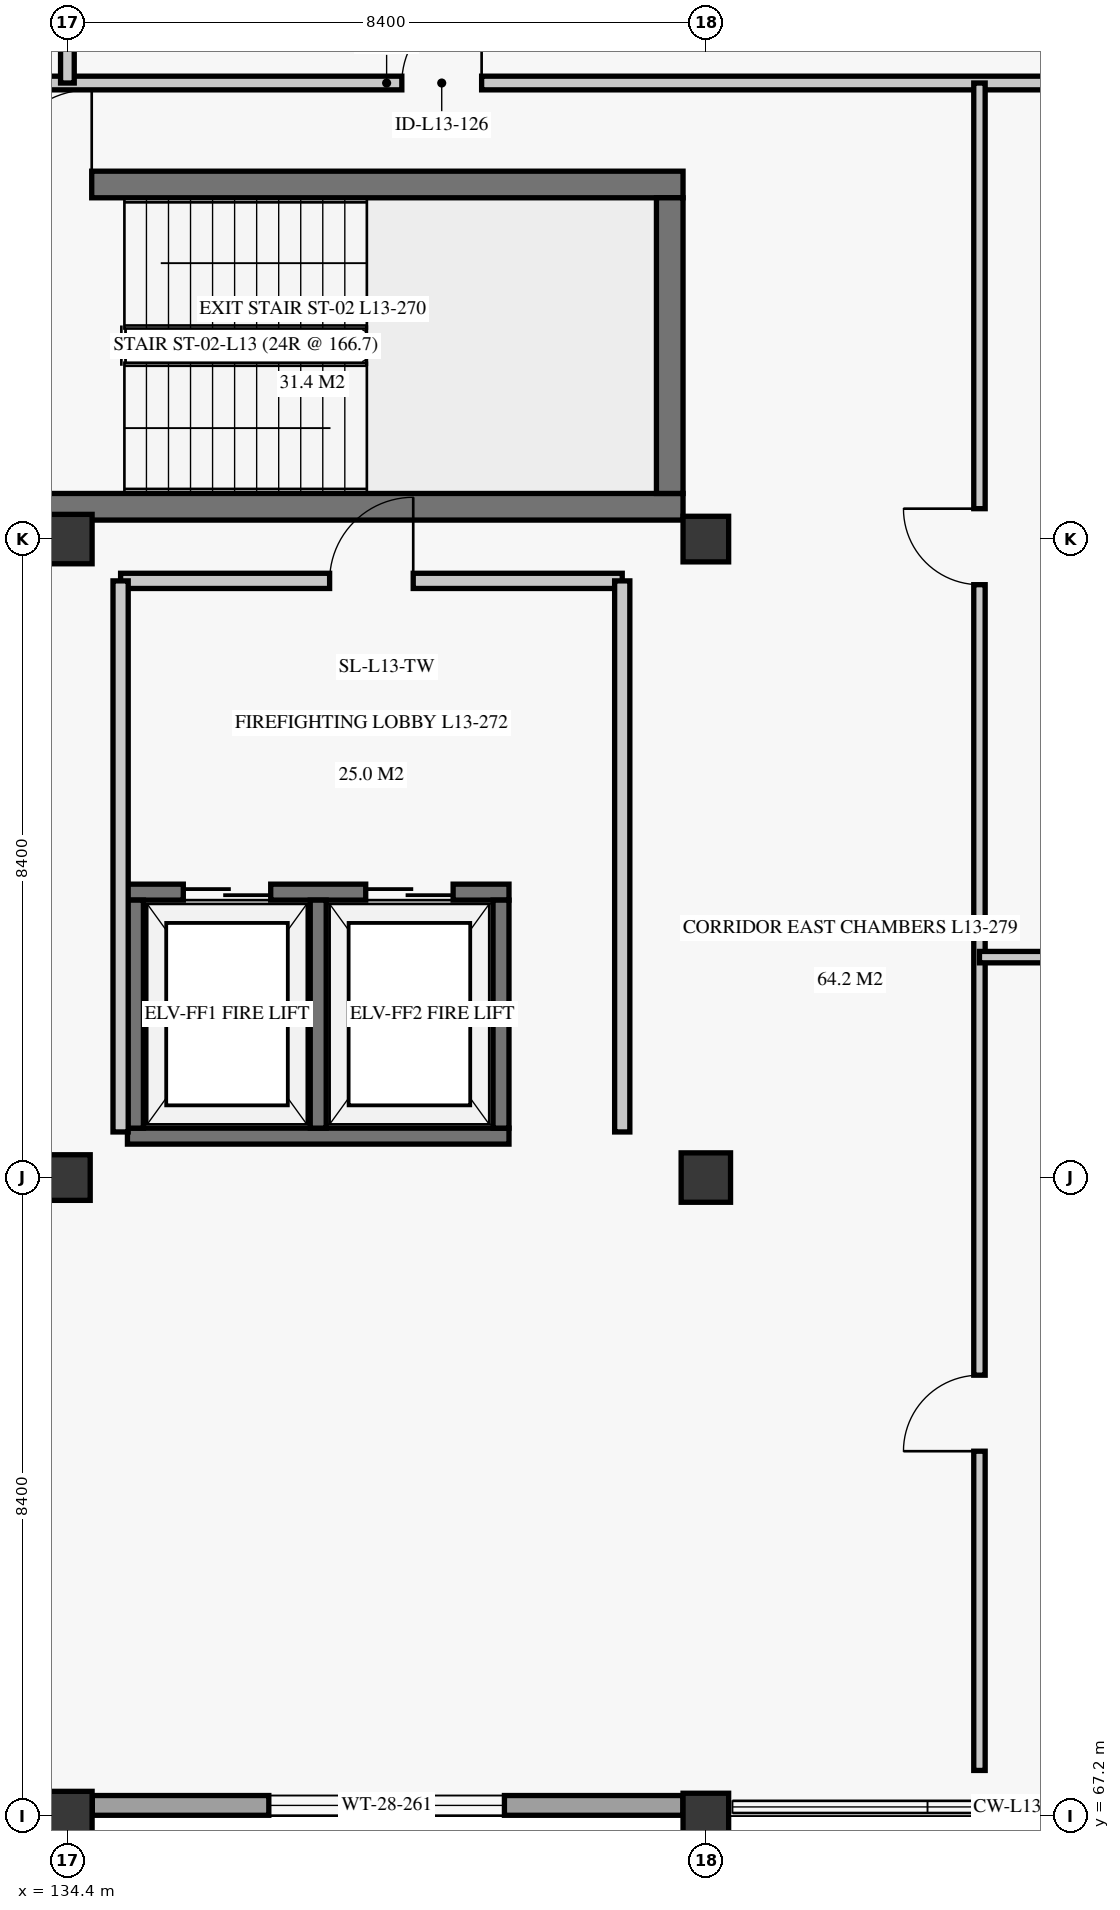
"""IFC4 building model, lengths in metres.
Left out: names, types, materials, properties, quantities, classifications, styles, units other than length and angle.
Written with IfcOpenShell. Run it as: python <this file> out.ifc"""

import sys

from ifc_helpers import new_model, si_unit, direction, frame, frame_2d, origin, origin_2d, place, context, subcontext, project, spatial, rectangle, extrude, element, fill, save


model = new_model("IFC4")
c1 = context("Model", 3, precision=1e-05, world=origin(), true_north=direction((0.0, 1.0)))
c2 = subcontext(c1, "Body", "Model", "MODEL_VIEW")
j1 = project(units=[si_unit("LENGTHUNIT", "METRE"), si_unit("PLANEANGLEUNIT", "RADIAN")], contexts=[c1])
p1 = place(None, origin())
s1 = spatial("IfcSite", under=j1, at=p1, CompositionType="ELEMENT")
p2 = place(p1, origin())
s2 = spatial("IfcBuilding", under=s1, at=p2, CompositionType="ELEMENT")
p3 = place(p2, frame((0.0, 0.0, 54.7)))
s3 = spatial("IfcBuildingStorey", under=s2, at=p3, CompositionType="ELEMENT", Elevation=54.7)
p4 = place(p3, frame((134.4, 67.2, 0.0), z_axis=(0.0, 0.0, 1.0), x_axis=(1.0, 0.0, 0.0)))
e1 = element("IfcColumn", 1, at=p4, inside=s3, PredefinedType="COLUMN", context=c2, shape_type="SweptSolid", body=[
    extrude(rectangle(XDim=0.65, YDim=0.65, at=origin_2d()), origin(), (0.0, 0.0, 1.0), 3.72),
])
p5 = place(p3, frame((134.4, 75.6, 0.0), z_axis=(0.0, 0.0, 1.0), x_axis=(1.0, 0.0, 0.0)))
e2 = element("IfcColumn", 2, at=p5, inside=s3, PredefinedType="COLUMN", context=c2, shape_type="SweptSolid", body=[
    extrude(rectangle(XDim=0.6, YDim=0.6, at=origin_2d()), origin(), (0.0, 0.0, 1.0), 3.72),
])
p6 = place(p3, frame((134.4, 84.0, 0.0), z_axis=(0.0, 0.0, 1.0), x_axis=(1.0, 0.0, 0.0)))
e3 = element("IfcColumn", 3, at=p6, inside=s3, PredefinedType="COLUMN", context=c2, shape_type="SweptSolid", body=[
    extrude(rectangle(XDim=0.65, YDim=0.65, at=origin_2d()), origin(), (0.0, 0.0, 1.0), 3.72),
])
p7 = place(p3, frame((142.8, 67.2, 0.0), z_axis=(0.0, 0.0, 1.0), x_axis=(1.0, 0.0, 0.0)))
e4 = element("IfcColumn", 4, at=p7, inside=s3, PredefinedType="COLUMN", context=c2, shape_type="SweptSolid", body=[
    extrude(rectangle(XDim=0.6, YDim=0.6, at=origin_2d()), origin(), (0.0, 0.0, 1.0), 3.72),
])
p8 = place(p3, frame((142.8, 75.6, 0.0), z_axis=(0.0, 0.0, 1.0), x_axis=(1.0, 0.0, 0.0)))
e5 = element("IfcColumn", 5, at=p8, inside=s3, PredefinedType="COLUMN", context=c2, shape_type="SweptSolid", body=[
    extrude(rectangle(XDim=0.65, YDim=0.65, at=origin_2d()), origin(), (0.0, 0.0, 1.0), 3.72),
])
p9 = place(p3, frame((142.8, 84.0, 0.0), z_axis=(0.0, 0.0, 1.0), x_axis=(1.0, 0.0, 0.0)))
e6 = element("IfcColumn", 6, at=p9, inside=s3, PredefinedType="COLUMN", context=c2, shape_type="SweptSolid", body=[
    extrude(rectangle(XDim=0.6, YDim=0.6, at=origin_2d()), origin(), (0.0, 0.0, 1.0), 3.72),
])
p10 = place(p3, frame((134.728, 67.34, 0.0), z_axis=(0.0, 0.0, 1.0), x_axis=(1.0, 0.0, 0.0)))
e7 = element("IfcWall", 7, at=p10, inside=s3, PredefinedType="SOLIDWALL", context=c2, shape_type="SweptSolid", body=[
    extrude(rectangle(XDim=7.77, YDim=0.26, at=frame_2d((3.885, 0.0))), origin(), (0.0, 0.0, 1.0), 3.04),
])
p11 = place(p10, frame((2.322, 0.0, 0.85)))
e8 = element("IfcOpeningElement", 8, at=p11, cuts=e7, PredefinedType="OPENING", context=c2, shape_type="SweptSolid", body=[
    extrude(rectangle(XDim=3.1, YDim=1.85, at=frame_2d((1.55, 0.925))), frame((0.0, 0.14, 0.0), z_axis=(0.0, -1.0, 0.0), x_axis=(1.0, 0.0, 0.0)), (0.0, 0.0, 1.0), 0.28),
])
p12 = place(p3, frame((132.75, 84.425, 0.0), z_axis=(0.0, 0.0, 1.0), x_axis=(1.0, 0.0, 0.0)))
e9 = element("IfcWall", 9, at=p12, inside=s3, PredefinedType="SHEAR", context=c2, shape_type="SweptSolid", body=[
    extrude(rectangle(XDim=9.75, YDim=0.35, at=frame_2d((4.875, 0.0))), origin(), (0.0, 0.0, 1.0), 3.72),
])
p13 = place(p3, frame((132.75, 88.665, 0.0), z_axis=(0.0, 0.0, 1.0), x_axis=(1.0, 0.0, 0.0)))
e10 = element("IfcWall", 10, at=p13, inside=s3, PredefinedType="SHEAR", context=c2, shape_type="SweptSolid", body=[
    extrude(rectangle(XDim=9.75, YDim=0.35, at=frame_2d((4.875, 0.0))), origin(), (0.0, 0.0, 1.0), 3.72),
])
p14 = place(p13, frame((0.72, 0.0, 0.0)))
e11 = element("IfcOpeningElement", 11, at=p14, cuts=e10, PredefinedType="OPENING", context=c2, shape_type="SweptSolid", body=[
    extrude(rectangle(XDim=1.25, YDim=2.2, at=frame_2d((0.625, 1.1))), frame((0.0, 0.185, 0.0), z_axis=(0.0, -1.0, 0.0), x_axis=(1.0, 0.0, 0.0)), (0.0, 0.0, 1.0), 0.37),
])
p15 = place(p3, frame((142.325, 84.6, 0.0), z_axis=(0.0, 0.0, 1.0), x_axis=(0.0, 1.0, 0.0)))
e12 = element("IfcWall", 12, at=p15, inside=s3, PredefinedType="SHEAR", context=c2, shape_type="SweptSolid", body=[
    extrude(rectangle(XDim=3.89, YDim=0.35, at=frame_2d((1.945, 0.0))), origin(), (0.0, 0.0, 1.0), 3.72),
])
p16 = place(p3, frame((135.19, 76.145, 0.0), z_axis=(0.0, 0.0, 1.0), x_axis=(1.0, 0.0, 0.0)))
e13 = element("IfcWall", 13, at=p16, inside=s3, PredefinedType="SHEAR", context=c2, shape_type="SweptSolid", body=[
    extrude(rectangle(XDim=5.02, YDim=0.21, at=frame_2d((2.51, 0.0))), origin(), (0.0, 0.0, 1.0), 3.72),
])
p17 = place(p3, frame((135.19, 79.355, 0.0), z_axis=(0.0, 0.0, 1.0), x_axis=(1.0, 0.0, 0.0)))
e14 = element("IfcWall", 14, at=p17, inside=s3, PredefinedType="SHEAR", context=c2, shape_type="SweptSolid", body=[
    extrude(rectangle(XDim=5.02, YDim=0.21, at=frame_2d((2.51, 0.0))), origin(), (0.0, 0.0, 1.0), 3.72),
])
p18 = place(p17, frame((0.735, 0.0, 0.0)))
e15 = element("IfcOpeningElement", 15, at=p18, cuts=e14, PredefinedType="OPENING", context=c2, shape_type="SweptSolid", body=[
    extrude(rectangle(XDim=1.15, YDim=2.2, at=frame_2d((0.575, 1.1))), frame((0.0, 0.115, 0.0), z_axis=(0.0, -1.0, 0.0), x_axis=(1.0, 0.0, 0.0)), (0.0, 0.0, 1.0), 0.23),
])
p19 = place(p17, frame((3.135, 0.0, 0.0)))
e16 = element("IfcOpeningElement", 16, at=p19, cuts=e14, PredefinedType="OPENING", context=c2, shape_type="SweptSolid", body=[
    extrude(rectangle(XDim=1.15, YDim=2.2, at=frame_2d((0.575, 1.1))), frame((0.0, 0.115, 0.0), z_axis=(0.0, -1.0, 0.0), x_axis=(1.0, 0.0, 0.0)), (0.0, 0.0, 1.0), 0.23),
])
for number, where, z_axis, x_axis in (
    (17, (135.295, 76.25, 0.0), (0.0, 0.0, 1.0), (0.0, 1.0, 0.0)),
    (18, (140.105, 76.25, 0.0), (0.0, 0.0, 1.0), (0.0, 1.0, 0.0)),
    (19, (137.7, 76.25, 0.0), (0.0, 0.0, 1.0), (0.0, 1.0, 0.0)),
):
    element("IfcWall", number, at=place(p3, frame(where, z_axis=z_axis, x_axis=x_axis)), inside=s3, PredefinedType="SHEAR", context=c2, shape_type="SweptSolid", body=[
        extrude(rectangle(XDim=3.0, YDim=0.21, at=frame_2d((1.5, 0.0))), origin(), (0.0, 0.0, 1.0), 3.72),
    ])
p20 = place(p3, frame((135.1, 83.45, 0.0), z_axis=(0.0, 0.0, 1.0), x_axis=(1.0, 0.0, 0.0)))
e20 = element("IfcWall", 20, at=p20, inside=s3, PredefinedType="PARTITIONING", context=c2, shape_type="SweptSolid", body=[
    extrude(rectangle(XDim=6.6, YDim=0.2, at=frame_2d((3.3, 0.0))), origin(), (0.0, 0.0, 1.0), 3.34),
])
p21 = place(p20, frame((2.75, 0.0, 0.0)))
e21 = element("IfcOpeningElement", 21, at=p21, cuts=e20, PredefinedType="OPENING", context=c2, shape_type="SweptSolid", body=[
    extrude(rectangle(XDim=1.1, YDim=2.2, at=frame_2d((0.55, 1.1))), frame((0.0, 0.11, 0.0), z_axis=(0.0, -1.0, 0.0), x_axis=(1.0, 0.0, 0.0)), (0.0, 0.0, 1.0), 0.22),
])
for number, where, z_axis, x_axis in (
    (22, (135.1, 76.2, 0.0), (0.0, 0.0, 1.0), (0.0, 1.0, 0.0)),
    (23, (141.7, 76.2, 0.0), (0.0, 0.0, 1.0), (0.0, 1.0, 0.0)),
):
    element("IfcWall", number, at=place(p3, frame(where, z_axis=z_axis, x_axis=x_axis)), inside=s3, PredefinedType="PARTITIONING", context=c2, shape_type="SweptSolid", body=[
        extrude(rectangle(XDim=7.25, YDim=0.2, at=frame_2d((3.625, 0.0))), origin(), (0.0, 0.0, 1.0), 3.34),
    ])
p22 = place(p3, frame((118.2, 90.0, 0.0), z_axis=(0.0, 0.0, 1.0), x_axis=(1.0, 0.0, 0.0)))
e24 = element("IfcWall", 24, at=p22, inside=s3, PredefinedType="PARTITIONING", context=c2, shape_type="SweptSolid", body=[
    extrude(rectangle(XDim=40.8, YDim=0.18, at=frame_2d((20.4, 0.0))), origin(), (0.0, 0.0, 1.0), 3.34),
])
p23 = place(p22, frame((3.2, 0.0, 0.0)))
e25 = element("IfcOpeningElement", 25, at=p23, cuts=e24, PredefinedType="OPENING", context=c2, shape_type="SweptSolid", body=[
    extrude(rectangle(XDim=1.05, YDim=2.2, at=frame_2d((0.525, 1.1))), frame((0.0, 0.1, 0.0), z_axis=(0.0, -1.0, 0.0), x_axis=(1.0, 0.0, 0.0)), (0.0, 0.0, 1.0), 0.2),
])
p24 = place(p22, frame((20.6, 0.0, 0.0)))
e26 = element("IfcOpeningElement", 26, at=p24, cuts=e24, PredefinedType="OPENING", context=c2, shape_type="SweptSolid", body=[
    extrude(rectangle(XDim=1.05, YDim=2.2, at=frame_2d((0.525, 1.1))), frame((0.0, 0.1, 0.0), z_axis=(0.0, -1.0, 0.0), x_axis=(1.0, 0.0, 0.0)), (0.0, 0.0, 1.0), 0.2),
])
p25 = place(p3, frame((134.4, 90.0, 0.0), z_axis=(0.0, 0.0, 1.0), x_axis=(0.0, 1.0, 0.0)))
e27 = element("IfcWall", 27, at=p25, inside=s3, PredefinedType="PARTITIONING", context=c2, shape_type="SweptSolid", body=[
    extrude(rectangle(XDim=10.2, YDim=0.18, at=frame_2d((5.1, 0.0))), origin(), (0.0, 0.0, 1.0), 3.34),
])
p26 = place(p3, frame((146.4, 67.8, 0.0), z_axis=(0.0, 0.0, 1.0), x_axis=(0.0, 1.0, 0.0)))
e28 = element("IfcWall", 28, at=p26, inside=s3, PredefinedType="PARTITIONING", context=c2, shape_type="SweptSolid", body=[
    extrude(rectangle(XDim=22.2, YDim=0.15, at=frame_2d((11.1, 0.0))), origin(), (0.0, 0.0, 1.0), 3.34),
])
p27 = place(p26, frame((4.2, 0.0, 0.0)))
e29 = element("IfcOpeningElement", 29, at=p27, cuts=e28, PredefinedType="OPENING", context=c2, shape_type="SweptSolid", body=[
    extrude(rectangle(XDim=1.0, YDim=2.1, at=frame_2d((0.5, 1.05))), frame((0.0, 0.085, 0.0), z_axis=(0.0, -1.0, 0.0), x_axis=(1.0, 0.0, 0.0)), (0.0, 0.0, 1.0), 0.17),
])
p28 = place(p26, frame((15.6, 0.0, 0.0)))
e30 = element("IfcOpeningElement", 30, at=p28, cuts=e28, PredefinedType="OPENING", context=c2, shape_type="SweptSolid", body=[
    extrude(rectangle(XDim=1.0, YDim=2.1, at=frame_2d((0.5, 1.05))), frame((0.0, 0.085, 0.0), z_axis=(0.0, -1.0, 0.0), x_axis=(1.0, 0.0, 0.0)), (0.0, 0.0, 1.0), 0.17),
])
p29 = place(p3, frame((146.4, 78.5, 0.0), z_axis=(0.0, 0.0, 1.0), x_axis=(1.0, 0.0, 0.0)))
e31 = element("IfcWall", 31, at=p29, inside=s3, PredefinedType="PARTITIONING", context=c2, shape_type="SweptSolid", body=[
    extrude(rectangle(XDim=12.6, YDim=0.15, at=frame_2d((6.3, 0.0))), origin(), (0.0, 0.0, 1.0), 3.34),
])
p30 = place(p11, origin())
e32 = element("IfcWindow", 32, at=p30, inside=s3, PartitioningType="SINGLE_PANEL", PredefinedType="WINDOW", context=c2, shape_type="SweptSolid", body=[
    extrude(rectangle(XDim=3.1, YDim=1.85, at=frame_2d((1.55, 0.925))), frame((0.0, 0.03, 0.0), z_axis=(0.0, -1.0, 0.0), x_axis=(1.0, 0.0, 0.0)), (0.0, 0.0, 1.0), 0.06),
])
fill(e8, e32)
p31 = place(p14, origin())
e33 = element("IfcDoor", 33, at=p31, inside=s3, OperationType="SINGLE_SWING_RIGHT", PredefinedType="DOOR", context=c2, shape_type="SweptSolid", body=[
    extrude(rectangle(XDim=1.25, YDim=2.2, at=frame_2d((0.625, 1.1))), frame((0.0, 0.025, 0.0), z_axis=(0.0, -1.0, 0.0), x_axis=(1.0, 0.0, 0.0)), (0.0, 0.0, 1.0), 0.05),
])
fill(e11, e33)
p32 = place(p18, origin())
e34 = element("IfcDoor", 34, at=p32, inside=s3, OperationType="DOUBLE_DOOR_SLIDING", PredefinedType="DOOR", context=c2, shape_type="SweptSolid", body=[
    extrude(rectangle(XDim=1.15, YDim=2.2, at=frame_2d((0.575, 1.1))), frame((0.0, 0.025, 0.0), z_axis=(0.0, -1.0, 0.0), x_axis=(1.0, 0.0, 0.0)), (0.0, 0.0, 1.0), 0.05),
])
fill(e15, e34)
p33 = place(p19, origin())
e35 = element("IfcDoor", 35, at=p33, inside=s3, OperationType="DOUBLE_DOOR_SLIDING", PredefinedType="DOOR", context=c2, shape_type="SweptSolid", body=[
    extrude(rectangle(XDim=1.15, YDim=2.2, at=frame_2d((0.575, 1.1))), frame((0.0, 0.025, 0.0), z_axis=(0.0, -1.0, 0.0), x_axis=(1.0, 0.0, 0.0)), (0.0, 0.0, 1.0), 0.05),
])
fill(e16, e35)
p34 = place(p21, origin())
e36 = element("IfcDoor", 36, at=p34, inside=s3, OperationType="SINGLE_SWING_RIGHT", PredefinedType="DOOR", context=c2, shape_type="SweptSolid", body=[
    extrude(rectangle(XDim=1.1, YDim=2.2, at=frame_2d((0.55, 1.1))), frame((0.0, 0.025, 0.0), z_axis=(0.0, -1.0, 0.0), x_axis=(1.0, 0.0, 0.0)), (0.0, 0.0, 1.0), 0.05),
])
fill(e21, e36)
p35 = place(p24, origin())
e37 = element("IfcDoor", 37, at=p35, inside=s3, OperationType="SINGLE_SWING_RIGHT", PredefinedType="DOOR", context=c2, shape_type="SweptSolid", body=[
    extrude(rectangle(XDim=1.05, YDim=2.2, at=frame_2d((0.525, 1.1))), frame((0.0, 0.025, 0.0), z_axis=(0.0, -1.0, 0.0), x_axis=(1.0, 0.0, 0.0)), (0.0, 0.0, 1.0), 0.05),
])
fill(e26, e37)
p36 = place(p27, origin())
e38 = element("IfcDoor", 38, at=p36, inside=s3, OperationType="SINGLE_SWING_LEFT", PredefinedType="DOOR", context=c2, shape_type="SweptSolid", body=[
    extrude(rectangle(XDim=1.0, YDim=2.1, at=frame_2d((0.5, 1.05))), frame((0.0, 0.025, 0.0), z_axis=(0.0, -1.0, 0.0), x_axis=(1.0, 0.0, 0.0)), (0.0, 0.0, 1.0), 0.05),
])
fill(e29, e38)
p37 = place(p28, origin())
e39 = element("IfcDoor", 39, at=p37, inside=s3, OperationType="SINGLE_SWING_RIGHT", PredefinedType="DOOR", context=c2, shape_type="SweptSolid", body=[
    extrude(rectangle(XDim=1.0, YDim=2.1, at=frame_2d((0.5, 1.05))), frame((0.0, 0.025, 0.0), z_axis=(0.0, -1.0, 0.0), x_axis=(1.0, 0.0, 0.0)), (0.0, 0.0, 1.0), 0.05),
])
fill(e30, e39)
save(model, sys.argv[1])
